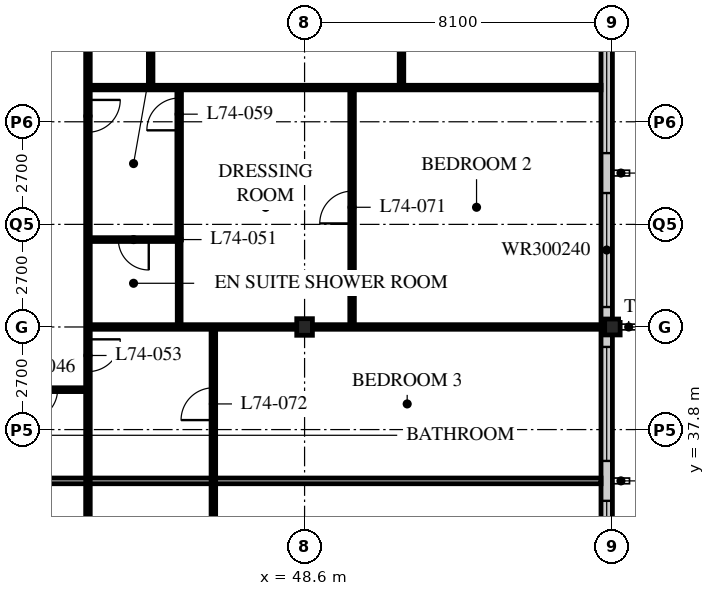
"""IFC4 building model, lengths in metres.
Left out: names, types, materials, properties, quantities, classifications, styles, units other than length and angle.
Written with IfcOpenShell. Run it as: python <this file> out.ifc"""

import sys

from ifc_helpers import new_model, si_unit, direction, frame, frame_2d, origin, origin_2d, place, context, subcontext, project, spatial, rectangle, i_section, extrude, element, fill, save


model = new_model("IFC4")
c1 = context("Model", 3, precision=1e-05, world=origin(), true_north=direction((0.0, 1.0)))
c2 = subcontext(c1, "Body", "Model", "MODEL_VIEW")
j1 = project(units=[si_unit("LENGTHUNIT", "METRE"), si_unit("PLANEANGLEUNIT", "RADIAN")], contexts=[c1])
p1 = place(None, origin())
s1 = spatial("IfcSite", under=j1, at=p1, CompositionType="ELEMENT")
p2 = place(p1, origin())
s2 = spatial("IfcBuilding", under=s1, at=p2, CompositionType="ELEMENT")
p3 = place(p2, frame((0.0, 0.0, 289.2)))
s3 = spatial("IfcBuildingStorey", under=s2, at=p3, CompositionType="ELEMENT", Elevation=289.2)
p4 = place(p3, frame((48.6, 40.5, 0.0), z_axis=(0.0, 0.0, 1.0), x_axis=(1.0, 0.0, 0.0)))
e1 = element("IfcColumn", 1, at=p4, inside=s3, PredefinedType="COLUMN", context=c2, shape_type="SweptSolid", body=[
    extrude(i_section(OverallWidth=0.412, OverallDepth=0.437, WebThickness=0.036, FlangeThickness=0.058, FilletRadius=0.015, at=origin_2d()), origin(), (0.0, 0.0, 1.0), 3.9),
])
p5 = place(p3, frame((56.7, 40.5, 0.0), z_axis=(0.0, 0.0, 1.0), x_axis=(1.0, 0.0, 0.0)))
e2 = element("IfcColumn", 2, at=p5, inside=s3, PredefinedType="COLUMN", context=c2, shape_type="SweptSolid", body=[
    extrude(i_section(OverallWidth=0.407, OverallDepth=0.419, WebThickness=0.031, FlangeThickness=0.049, FilletRadius=0.015, at=origin_2d()), origin(), (0.0, 0.0, 1.0), 3.9),
])
p6 = place(p3, frame((56.55, 24.6, 0.0), z_axis=(0.0, 0.0, 1.0), x_axis=(0.0, 1.0, 0.0)))
e3 = element("IfcWall", 3, at=p6, inside=s3, PredefinedType="SOLIDWALL", context=c2, shape_type="SweptSolid", body=[
    extrude(rectangle(XDim=32.1, YDim=0.3, at=frame_2d((16.05, 0.0))), origin(), (0.0, 0.0, 1.0), 3.69),
])
p7 = place(p6, frame((0.225, 0.0, 0.6)))
e4 = element("IfcOpeningElement", 4, at=p7, cuts=e3, PredefinedType="OPENING", context=c2, shape_type="SweptSolid", body=[
    extrude(rectangle(XDim=3.0, YDim=2.4, at=frame_2d((1.5, 1.2))), frame((0.0, 0.16, 0.0), z_axis=(0.0, -1.0, 0.0), x_axis=(1.0, 0.0, 0.0)), (0.0, 0.0, 1.0), 0.32),
])
p8 = place(p6, frame((4.275, 0.0, 0.6)))
e5 = element("IfcOpeningElement", 5, at=p8, cuts=e3, PredefinedType="OPENING", context=c2, shape_type="SweptSolid", body=[
    extrude(rectangle(XDim=3.0, YDim=2.4, at=frame_2d((1.5, 1.2))), frame((0.0, 0.16, 0.0), z_axis=(0.0, -1.0, 0.0), x_axis=(1.0, 0.0, 0.0)), (0.0, 0.0, 1.0), 0.32),
])
p9 = place(p6, frame((8.325, 0.0, 0.6)))
e6 = element("IfcOpeningElement", 6, at=p9, cuts=e3, PredefinedType="OPENING", context=c2, shape_type="SweptSolid", body=[
    extrude(rectangle(XDim=3.0, YDim=2.4, at=frame_2d((1.5, 1.2))), frame((0.0, 0.16, 0.0), z_axis=(0.0, -1.0, 0.0), x_axis=(1.0, 0.0, 0.0)), (0.0, 0.0, 1.0), 0.32),
])
p10 = place(p6, frame((12.375, 0.0, 0.6)))
e7 = element("IfcOpeningElement", 7, at=p10, cuts=e3, PredefinedType="OPENING", context=c2, shape_type="SweptSolid", body=[
    extrude(rectangle(XDim=3.0, YDim=2.4, at=frame_2d((1.5, 1.2))), frame((0.0, 0.16, 0.0), z_axis=(0.0, -1.0, 0.0), x_axis=(1.0, 0.0, 0.0)), (0.0, 0.0, 1.0), 0.32),
])
p11 = place(p6, frame((16.425, 0.0, 0.6)))
e8 = element("IfcOpeningElement", 8, at=p11, cuts=e3, PredefinedType="OPENING", context=c2, shape_type="SweptSolid", body=[
    extrude(rectangle(XDim=3.0, YDim=2.4, at=frame_2d((1.5, 1.2))), frame((0.0, 0.16, 0.0), z_axis=(0.0, -1.0, 0.0), x_axis=(1.0, 0.0, 0.0)), (0.0, 0.0, 1.0), 0.32),
])
p12 = place(p6, frame((20.475, 0.0, 0.6)))
e9 = element("IfcOpeningElement", 9, at=p12, cuts=e3, PredefinedType="OPENING", context=c2, shape_type="SweptSolid", body=[
    extrude(rectangle(XDim=3.0, YDim=2.4, at=frame_2d((1.5, 1.2))), frame((0.0, 0.16, 0.0), z_axis=(0.0, -1.0, 0.0), x_axis=(1.0, 0.0, 0.0)), (0.0, 0.0, 1.0), 0.32),
])
p13 = place(p6, frame((24.525, 0.0, 0.6)))
e10 = element("IfcOpeningElement", 10, at=p13, cuts=e3, PredefinedType="OPENING", context=c2, shape_type="SweptSolid", body=[
    extrude(rectangle(XDim=3.0, YDim=2.4, at=frame_2d((1.5, 1.2))), frame((0.0, 0.16, 0.0), z_axis=(0.0, -1.0, 0.0), x_axis=(1.0, 0.0, 0.0)), (0.0, 0.0, 1.0), 0.32),
])
p14 = place(p6, frame((28.575, 0.0, 0.6)))
e11 = element("IfcOpeningElement", 11, at=p14, cuts=e3, PredefinedType="OPENING", context=c2, shape_type="SweptSolid", body=[
    extrude(rectangle(XDim=3.0, YDim=2.4, at=frame_2d((1.5, 1.2))), frame((0.0, 0.16, 0.0), z_axis=(0.0, -1.0, 0.0), x_axis=(1.0, 0.0, 0.0)), (0.0, 0.0, 1.0), 0.32),
])
p15 = place(p3, frame((42.9, 22.5, 0.0), z_axis=(0.0, 0.0, 1.0), x_axis=(0.0, 1.0, 0.0)))
e12 = element("IfcWall", 12, at=p15, inside=s3, PredefinedType="PARTITIONING", context=c2, shape_type="SweptSolid", body=[
    extrude(rectangle(XDim=13.95, YDim=0.12, at=frame_2d((6.975, 0.0))), origin(), (0.0, 0.0, 1.0), 3.69),
])
p16 = place(p15, frame((2.125, 0.0, 0.0)))
e13 = element("IfcOpeningElement", 13, at=p16, cuts=e12, PredefinedType="OPENING", context=c2, shape_type="SweptSolid", body=[
    extrude(rectangle(XDim=0.85, YDim=2.1, at=frame_2d((0.425, 1.05))), frame((0.0, 0.07, 0.0), z_axis=(0.0, -1.0, 0.0), x_axis=(1.0, 0.0, 0.0)), (0.0, 0.0, 1.0), 0.14),
])
p17 = place(p15, frame((6.175, 0.0, 0.0)))
e14 = element("IfcOpeningElement", 14, at=p17, cuts=e12, PredefinedType="OPENING", context=c2, shape_type="SweptSolid", body=[
    extrude(rectangle(XDim=0.85, YDim=2.1, at=frame_2d((0.425, 1.05))), frame((0.0, 0.07, 0.0), z_axis=(0.0, -1.0, 0.0), x_axis=(1.0, 0.0, 0.0)), (0.0, 0.0, 1.0), 0.14),
])
p18 = place(p15, frame((10.225, 0.0, 0.0)))
e15 = element("IfcOpeningElement", 15, at=p18, cuts=e12, PredefinedType="OPENING", context=c2, shape_type="SweptSolid", body=[
    extrude(rectangle(XDim=0.85, YDim=2.1, at=frame_2d((0.425, 1.05))), frame((0.0, 0.07, 0.0), z_axis=(0.0, -1.0, 0.0), x_axis=(1.0, 0.0, 0.0)), (0.0, 0.0, 1.0), 0.14),
])
p19 = place(p3, frame((40.5, 36.45, 0.0), z_axis=(0.0, 0.0, 1.0), x_axis=(1.0, 0.0, 0.0)))
e16 = element("IfcWall", 16, at=p19, inside=s3, PredefinedType="PARTITIONING", context=c2, shape_type="SweptSolid", body=[
    extrude(rectangle(XDim=15.9, YDim=0.15, at=frame_2d((7.95, 0.0))), origin(), (0.0, 0.0, 1.0), 3.69),
])
p20 = place(p3, frame((40.5, 38.85, 0.0), z_axis=(0.0, 0.0, 1.0), x_axis=(1.0, 0.0, 0.0)))
e17 = element("IfcWall", 17, at=p20, inside=s3, PredefinedType="PARTITIONING", context=c2, shape_type="SweptSolid", body=[
    extrude(rectangle(XDim=2.4, YDim=0.1, at=frame_2d((1.2, 0.0))), origin(), (0.0, 0.0, 1.0), 3.69),
])
p21 = place(p20, frame((0.8, 0.0, 0.0)))
e18 = element("IfcOpeningElement", 18, at=p21, cuts=e17, PredefinedType="OPENING", context=c2, shape_type="SweptSolid", body=[
    extrude(rectangle(XDim=0.8, YDim=2.1, at=frame_2d((0.4, 1.05))), frame((0.0, 0.06, 0.0), z_axis=(0.0, -1.0, 0.0), x_axis=(1.0, 0.0, 0.0)), (0.0, 0.0, 1.0), 0.12),
])
p22 = place(p3, frame((42.9, 48.6, 0.0), z_axis=(0.0, 0.0, 1.0), x_axis=(0.0, -1.0, 0.0)))
e19 = element("IfcWall", 19, at=p22, inside=s3, PredefinedType="PARTITIONING", context=c2, shape_type="SweptSolid", body=[
    extrude(rectangle(XDim=12.15, YDim=0.12, at=frame_2d((6.075, 0.0))), origin(), (0.0, 0.0, 1.0), 3.69),
])
p23 = place(p22, frame((2.125, 0.0, 0.0)))
e20 = element("IfcOpeningElement", 20, at=p23, cuts=e19, PredefinedType="OPENING", context=c2, shape_type="SweptSolid", body=[
    extrude(rectangle(XDim=0.85, YDim=2.1, at=frame_2d((0.425, 1.05))), frame((0.0, 0.07, 0.0), z_axis=(0.0, -1.0, 0.0), x_axis=(1.0, 0.0, 0.0)), (0.0, 0.0, 1.0), 0.14),
])
p24 = place(p22, frame((8.425, 0.0, 0.0)))
e21 = element("IfcOpeningElement", 21, at=p24, cuts=e19, PredefinedType="OPENING", context=c2, shape_type="SweptSolid", body=[
    extrude(rectangle(XDim=0.85, YDim=2.1, at=frame_2d((0.425, 1.05))), frame((0.0, 0.07, 0.0), z_axis=(0.0, -1.0, 0.0), x_axis=(1.0, 0.0, 0.0)), (0.0, 0.0, 1.0), 0.14),
])
p25 = place(p3, frame((42.9, 46.8, 0.0), z_axis=(0.0, 0.0, 1.0), x_axis=(1.0, 0.0, 0.0)))
e22 = element("IfcWall", 22, at=p25, inside=s3, PredefinedType="PARTITIONING", context=c2, shape_type="SweptSolid", body=[
    extrude(rectangle(XDim=13.5, YDim=0.12, at=frame_2d((6.75, 0.0))), origin(), (0.0, 0.0, 1.0), 3.69),
])
p26 = place(p3, frame((44.55, 64.5, 0.0), z_axis=(0.0, 0.0, 1.0), x_axis=(0.0, -1.0, 0.0)))
e23 = element("IfcWall", 23, at=p26, inside=s3, PredefinedType="PARTITIONING", context=c2, shape_type="SweptSolid", body=[
    extrude(rectangle(XDim=17.7, YDim=0.12, at=frame_2d((8.85, 0.0))), origin(), (0.0, 0.0, 1.0), 3.69),
])
p27 = place(p26, frame((12.475, 0.0, 0.0)))
e24 = element("IfcOpeningElement", 24, at=p27, cuts=e23, PredefinedType="OPENING", context=c2, shape_type="SweptSolid", body=[
    extrude(rectangle(XDim=0.85, YDim=2.1, at=frame_2d((0.425, 1.05))), frame((0.0, 0.07, 0.0), z_axis=(0.0, -1.0, 0.0), x_axis=(1.0, 0.0, 0.0)), (0.0, 0.0, 1.0), 0.14),
])
p28 = place(p26, frame((4.525, 0.0, 0.0)))
e25 = element("IfcOpeningElement", 25, at=p28, cuts=e23, PredefinedType="OPENING", context=c2, shape_type="SweptSolid", body=[
    extrude(rectangle(XDim=0.85, YDim=2.1, at=frame_2d((0.425, 1.05))), frame((0.0, 0.07, 0.0), z_axis=(0.0, -1.0, 0.0), x_axis=(1.0, 0.0, 0.0)), (0.0, 0.0, 1.0), 0.14),
])
p29 = place(p3, frame((42.9, 42.8, 0.0), z_axis=(0.0, 0.0, 1.0), x_axis=(1.0, 0.0, 0.0)))
e26 = element("IfcWall", 26, at=p29, inside=s3, PredefinedType="PARTITIONING", context=c2, shape_type="SweptSolid", body=[
    extrude(rectangle(XDim=2.4, YDim=0.1, at=frame_2d((1.2, 0.0))), origin(), (0.0, 0.0, 1.0), 3.69),
])
p30 = place(p29, frame((0.8, 0.0, 0.0)))
e27 = element("IfcOpeningElement", 27, at=p30, cuts=e26, PredefinedType="OPENING", context=c2, shape_type="SweptSolid", body=[
    extrude(rectangle(XDim=0.8, YDim=2.1, at=frame_2d((0.4, 1.05))), frame((0.0, 0.06, 0.0), z_axis=(0.0, -1.0, 0.0), x_axis=(1.0, 0.0, 0.0)), (0.0, 0.0, 1.0), 0.12),
])
p31 = place(p3, frame((45.3, 42.8, 0.0), z_axis=(0.0, 0.0, 1.0), x_axis=(0.0, -1.0, 0.0)))
e28 = element("IfcWall", 28, at=p31, inside=s3, PredefinedType="PARTITIONING", context=c2, shape_type="SweptSolid", body=[
    extrude(rectangle(XDim=2.3, YDim=0.1, at=frame_2d((1.15, 0.0))), origin(), (0.0, 0.0, 1.0), 3.69),
])
p32 = place(p3, frame((42.9, 40.5, 0.0), z_axis=(0.0, 0.0, 1.0), x_axis=(1.0, 0.0, 0.0)))
e29 = element("IfcWall", 29, at=p32, inside=s3, PredefinedType="PARTITIONING", context=c2, shape_type="SweptSolid", body=[
    extrude(rectangle(XDim=13.5, YDim=0.12, at=frame_2d((6.75, 0.0))), origin(), (0.0, 0.0, 1.0), 3.078),
])
p33 = place(p3, frame((45.3, 46.8, 0.0), z_axis=(0.0, 0.0, 1.0), x_axis=(0.0, -1.0, 0.0)))
e30 = element("IfcWall", 30, at=p33, inside=s3, PredefinedType="PARTITIONING", context=c2, shape_type="SweptSolid", body=[
    extrude(rectangle(XDim=4.01, YDim=0.12, at=frame_2d((2.005, 0.0))), origin(), (0.0, 0.0, 1.0), 3.69),
])
p34 = place(p33, frame((0.275, 0.0, 0.0)))
e31 = element("IfcOpeningElement", 31, at=p34, cuts=e30, PredefinedType="OPENING", context=c2, shape_type="SweptSolid", body=[
    extrude(rectangle(XDim=0.85, YDim=2.1, at=frame_2d((0.425, 1.05))), frame((0.0, 0.07, 0.0), z_axis=(0.0, -1.0, 0.0), x_axis=(1.0, 0.0, 0.0)), (0.0, 0.0, 1.0), 0.14),
])
p35 = place(p3, frame((46.2, 28.35, 0.0), z_axis=(0.0, 0.0, 1.0), x_axis=(0.0, 1.0, 0.0)))
e32 = element("IfcWall", 32, at=p35, inside=s3, PredefinedType="PARTITIONING", context=c2, shape_type="SweptSolid", body=[
    extrude(rectangle(XDim=12.15, YDim=0.12, at=frame_2d((6.075, 0.0))), origin(), (0.0, 0.0, 1.0), 3.69),
])
p36 = place(p35, frame((1.6, 0.0, 0.0)))
e33 = element("IfcOpeningElement", 33, at=p36, cuts=e32, PredefinedType="OPENING", context=c2, shape_type="SweptSolid", body=[
    extrude(rectangle(XDim=0.85, YDim=2.1, at=frame_2d((0.425, 1.05))), frame((0.0, 0.07, 0.0), z_axis=(0.0, -1.0, 0.0), x_axis=(1.0, 0.0, 0.0)), (0.0, 0.0, 1.0), 0.14),
])
p37 = place(p35, frame((5.65, 0.0, 0.0)))
e34 = element("IfcOpeningElement", 34, at=p37, cuts=e32, PredefinedType="OPENING", context=c2, shape_type="SweptSolid", body=[
    extrude(rectangle(XDim=0.85, YDim=2.1, at=frame_2d((0.425, 1.05))), frame((0.0, 0.07, 0.0), z_axis=(0.0, -1.0, 0.0), x_axis=(1.0, 0.0, 0.0)), (0.0, 0.0, 1.0), 0.14),
])
p38 = place(p35, frame((9.7, 0.0, 0.0)))
e35 = element("IfcOpeningElement", 35, at=p38, cuts=e32, PredefinedType="OPENING", context=c2, shape_type="SweptSolid", body=[
    extrude(rectangle(XDim=0.85, YDim=2.1, at=frame_2d((0.425, 1.05))), frame((0.0, 0.07, 0.0), z_axis=(0.0, -1.0, 0.0), x_axis=(1.0, 0.0, 0.0)), (0.0, 0.0, 1.0), 0.14),
])
p39 = place(p3, frame((51.15, 46.8, 0.0), z_axis=(0.0, 0.0, 1.0), x_axis=(0.0, 1.0, 0.0)))
e36 = element("IfcWall", 36, at=p39, inside=s3, PredefinedType="PARTITIONING", context=c2, shape_type="SweptSolid", body=[
    extrude(rectangle(XDim=7.8, YDim=0.12, at=frame_2d((3.9, 0.0))), origin(), (0.0, 0.0, 1.0), 3.69),
])
p40 = place(p39, frame((3.475, 0.0, 0.0)))
e37 = element("IfcOpeningElement", 37, at=p40, cuts=e36, PredefinedType="OPENING", context=c2, shape_type="SweptSolid", body=[
    extrude(rectangle(XDim=0.85, YDim=2.1, at=frame_2d((0.425, 1.05))), frame((0.0, 0.07, 0.0), z_axis=(0.0, -1.0, 0.0), x_axis=(1.0, 0.0, 0.0)), (0.0, 0.0, 1.0), 0.14),
])
p41 = place(p3, frame((49.85, 40.5, 0.0), z_axis=(0.0, 0.0, 1.0), x_axis=(0.0, 1.0, 0.0)))
e38 = element("IfcWall", 38, at=p41, inside=s3, PredefinedType="PARTITIONING", context=c2, shape_type="SweptSolid", body=[
    extrude(rectangle(XDim=6.3, YDim=0.12, at=frame_2d((3.15, 0.0))), origin(), (0.0, 0.0, 1.0), 3.69),
])
p42 = place(p41, frame((2.725, 0.0, 0.0)))
e39 = element("IfcOpeningElement", 39, at=p42, cuts=e38, PredefinedType="OPENING", context=c2, shape_type="SweptSolid", body=[
    extrude(rectangle(XDim=0.85, YDim=2.1, at=frame_2d((0.425, 1.05))), frame((0.0, 0.07, 0.0), z_axis=(0.0, -1.0, 0.0), x_axis=(1.0, 0.0, 0.0)), (0.0, 0.0, 1.0), 0.14),
])
p43 = place(p9, origin())
e40 = element("IfcWindow", 40, at=p43, inside=s3, PartitioningType="SINGLE_PANEL", PredefinedType="WINDOW", context=c2, shape_type="SweptSolid", body=[
    extrude(rectangle(XDim=3.0, YDim=2.4, at=frame_2d((1.5, 1.2))), frame((0.0, 0.03, 0.0), z_axis=(0.0, -1.0, 0.0), x_axis=(1.0, 0.0, 0.0)), (0.0, 0.0, 1.0), 0.06),
])
fill(e6, e40)
p44 = place(p10, origin())
e41 = element("IfcWindow", 41, at=p44, inside=s3, PartitioningType="SINGLE_PANEL", PredefinedType="WINDOW", context=c2, shape_type="SweptSolid", body=[
    extrude(rectangle(XDim=3.0, YDim=2.4, at=frame_2d((1.5, 1.2))), frame((0.0, 0.03, 0.0), z_axis=(0.0, -1.0, 0.0), x_axis=(1.0, 0.0, 0.0)), (0.0, 0.0, 1.0), 0.06),
])
fill(e7, e41)
p45 = place(p11, origin())
e42 = element("IfcWindow", 42, at=p45, inside=s3, PartitioningType="SINGLE_PANEL", PredefinedType="WINDOW", context=c2, shape_type="SweptSolid", body=[
    extrude(rectangle(XDim=3.0, YDim=2.4, at=frame_2d((1.5, 1.2))), frame((0.0, 0.03, 0.0), z_axis=(0.0, -1.0, 0.0), x_axis=(1.0, 0.0, 0.0)), (0.0, 0.0, 1.0), 0.06),
])
fill(e8, e42)
p46 = place(p12, origin())
e43 = element("IfcWindow", 43, at=p46, inside=s3, PartitioningType="SINGLE_PANEL", PredefinedType="WINDOW", context=c2, shape_type="SweptSolid", body=[
    extrude(rectangle(XDim=3.0, YDim=2.4, at=frame_2d((1.5, 1.2))), frame((0.0, 0.03, 0.0), z_axis=(0.0, -1.0, 0.0), x_axis=(1.0, 0.0, 0.0)), (0.0, 0.0, 1.0), 0.06),
])
fill(e9, e43)
p47 = place(p21, origin())
e44 = element("IfcDoor", 44, at=p47, inside=s3, OperationType="SINGLE_SWING_RIGHT", PredefinedType="DOOR", context=c2, shape_type="SweptSolid", body=[
    extrude(rectangle(XDim=0.8, YDim=2.1, at=frame_2d((0.4, 1.05))), frame((0.0, 0.025, 0.0), z_axis=(0.0, -1.0, 0.0), x_axis=(1.0, 0.0, 0.0)), (0.0, 0.0, 1.0), 0.05),
])
fill(e18, e44)
p48 = place(p30, origin())
e45 = element("IfcDoor", 45, at=p48, inside=s3, OperationType="SINGLE_SWING_LEFT", PredefinedType="DOOR", context=c2, shape_type="SweptSolid", body=[
    extrude(rectangle(XDim=0.8, YDim=2.1, at=frame_2d((0.4, 1.05))), frame((0.0, 0.025, 0.0), z_axis=(0.0, -1.0, 0.0), x_axis=(1.0, 0.0, 0.0)), (0.0, 0.0, 1.0), 0.05),
])
fill(e27, e45)
p49 = place(p23, origin())
e46 = element("IfcDoor", 46, at=p49, inside=s3, OperationType="SINGLE_SWING_LEFT", PredefinedType="DOOR", context=c2, shape_type="SweptSolid", body=[
    extrude(rectangle(XDim=0.85, YDim=2.1, at=frame_2d((0.425, 1.05))), frame((0.0, 0.025, 0.0), z_axis=(0.0, -1.0, 0.0), x_axis=(1.0, 0.0, 0.0)), (0.0, 0.0, 1.0), 0.05),
])
fill(e20, e46)
p50 = place(p24, origin())
e47 = element("IfcDoor", 47, at=p50, inside=s3, OperationType="SINGLE_SWING_LEFT", PredefinedType="DOOR", context=c2, shape_type="SweptSolid", body=[
    extrude(rectangle(XDim=0.85, YDim=2.1, at=frame_2d((0.425, 1.05))), frame((0.0, 0.025, 0.0), z_axis=(0.0, -1.0, 0.0), x_axis=(1.0, 0.0, 0.0)), (0.0, 0.0, 1.0), 0.05),
])
fill(e21, e47)
p51 = place(p34, origin())
e48 = element("IfcDoor", 48, at=p51, inside=s3, OperationType="SINGLE_SWING_LEFT", PredefinedType="DOOR", context=c2, shape_type="SweptSolid", body=[
    extrude(rectangle(XDim=0.85, YDim=2.1, at=frame_2d((0.425, 1.05))), frame((0.0, 0.025, 0.0), z_axis=(0.0, -1.0, 0.0), x_axis=(1.0, 0.0, 0.0)), (0.0, 0.0, 1.0), 0.05),
])
fill(e31, e48)
p52 = place(p42, origin())
e49 = element("IfcDoor", 49, at=p52, inside=s3, OperationType="SINGLE_SWING_LEFT", PredefinedType="DOOR", context=c2, shape_type="SweptSolid", body=[
    extrude(rectangle(XDim=0.85, YDim=2.1, at=frame_2d((0.425, 1.05))), frame((0.0, 0.025, 0.0), z_axis=(0.0, -1.0, 0.0), x_axis=(1.0, 0.0, 0.0)), (0.0, 0.0, 1.0), 0.05),
])
fill(e39, e49)
p53 = place(p38, origin())
e50 = element("IfcDoor", 50, at=p53, inside=s3, OperationType="SINGLE_SWING_LEFT", PredefinedType="DOOR", context=c2, shape_type="SweptSolid", body=[
    extrude(rectangle(XDim=0.85, YDim=2.1, at=frame_2d((0.425, 1.05))), frame((0.0, 0.025, 0.0), z_axis=(0.0, -1.0, 0.0), x_axis=(1.0, 0.0, 0.0)), (0.0, 0.0, 1.0), 0.05),
])
fill(e35, e50)
save(model, sys.argv[1])
